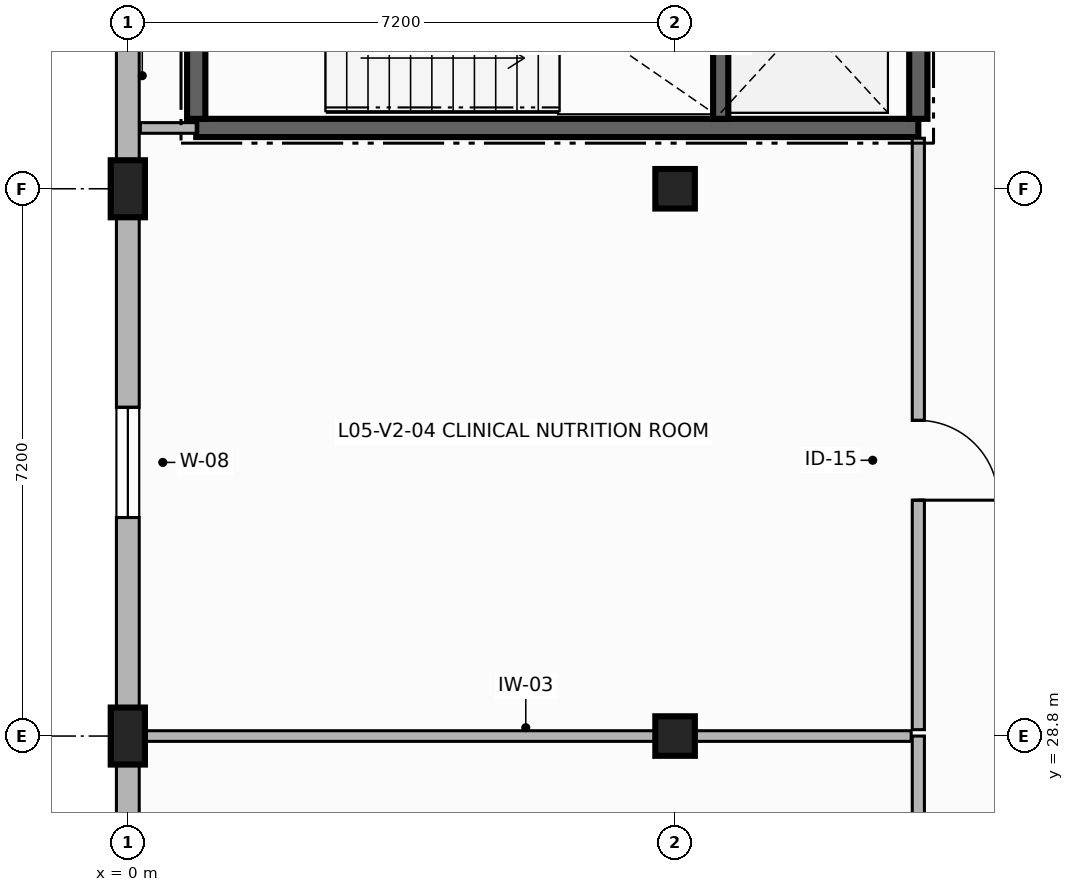
"""IFC4 building model, lengths in metres.
Left out: names, types, materials, properties, quantities, classifications, styles, units other than length and angle.
Written with IfcOpenShell. Run it as: python <this file> out.ifc"""

import sys

from ifc_helpers import new_model, si_unit, direction, frame, frame_2d, origin, origin_2d, place, context, subcontext, project, spatial, rectangle, extrude, element, fill, save


model = new_model("IFC4")
c1 = context("Model", 3, precision=1e-05, world=origin(), true_north=direction((0.0, 1.0)))
c2 = subcontext(c1, "Body", "Model", "MODEL_VIEW")
j1 = project(units=[si_unit("LENGTHUNIT", "METRE"), si_unit("PLANEANGLEUNIT", "RADIAN")], contexts=[c1])
p1 = place(None, origin())
s1 = spatial("IfcSite", under=j1, at=p1, CompositionType="ELEMENT")
p2 = place(p1, origin())
s2 = spatial("IfcBuilding", under=s1, at=p2, CompositionType="ELEMENT")
p3 = place(p2, frame((0.0, 0.0, 19.7)))
s3 = spatial("IfcBuildingStorey", under=s2, at=p3, CompositionType="ELEMENT", Elevation=19.7)
for number, where, z_axis, x_axis in (
    (1, (0.0, 28.8, 0.0), (0.0, 0.0, 1.0), (1.0, 0.0, 0.0)),
    (2, (0.0, 36.0, 0.0), (0.0, 0.0, 1.0), (1.0, 0.0, 0.0)),
):
    element("IfcColumn", number, at=place(p3, frame(where, z_axis=z_axis, x_axis=x_axis)), inside=s3, PredefinedType="PILASTER", context=c2, shape_type="SweptSolid", body=[
        extrude(rectangle(XDim=0.45, YDim=0.75, at=origin_2d()), origin(), (0.0, 0.0, 1.0), 3.42),
    ])
for number, where, z_axis, x_axis in (
    (3, (7.2, 28.8, 0.0), (0.0, 0.0, 1.0), (1.0, 0.0, 0.0)),
    (4, (7.2, 36.0, 0.0), (0.0, 0.0, 1.0), (1.0, 0.0, 0.0)),
):
    element("IfcColumn", number, at=place(p3, frame(where, z_axis=z_axis, x_axis=x_axis)), inside=s3, PredefinedType="COLUMN", context=c2, shape_type="SweptSolid", body=[
        extrude(rectangle(XDim=0.52, YDim=0.52, at=origin_2d()), origin(), (0.0, 0.0, 1.0), 3.42),
    ])
p4 = place(p3, frame((0.0, 43.2, 0.0), z_axis=(0.0, 0.0, 1.0), x_axis=(0.0, -1.0, 0.0)))
e5 = element("IfcWall", 5, at=p4, inside=s3, PredefinedType="SOLIDWALL", context=c2, shape_type="SweptSolid", body=[
    extrude(rectangle(XDim=7.2, YDim=0.3, at=frame_2d((3.6, 0.0))), origin(), (0.0, 0.0, 1.0), 2.8),
])
p5 = place(p4, frame((2.775, 0.0, 0.85)))
e6 = element("IfcOpeningElement", 6, at=p5, cuts=e5, PredefinedType="OPENING", context=c2, shape_type="SweptSolid", body=[
    extrude(rectangle(XDim=1.45, YDim=1.75, at=frame_2d((0.725, 0.875))), frame((0.0, 0.16, 0.0), z_axis=(0.0, -1.0, 0.0), x_axis=(1.0, 0.0, 0.0)), (0.0, 0.0, 1.0), 0.32),
])
p6 = place(p3, frame((0.0, 36.0, 0.0), z_axis=(0.0, 0.0, 1.0), x_axis=(0.0, -1.0, 0.0)))
e7 = element("IfcWall", 7, at=p6, inside=s3, PredefinedType="SOLIDWALL", context=c2, shape_type="SweptSolid", body=[
    extrude(rectangle(XDim=7.2, YDim=0.3, at=frame_2d((3.6, 0.0))), origin(), (0.0, 0.0, 1.0), 2.8),
])
p7 = place(p6, frame((2.875, 0.0, 0.85)))
e8 = element("IfcOpeningElement", 8, at=p7, cuts=e7, PredefinedType="OPENING", context=c2, shape_type="SweptSolid", body=[
    extrude(rectangle(XDim=1.45, YDim=1.75, at=frame_2d((0.725, 0.875))), frame((0.0, 0.16, 0.0), z_axis=(0.0, -1.0, 0.0), x_axis=(1.0, 0.0, 0.0)), (0.0, 0.0, 1.0), 0.32),
])
p8 = place(p3, frame((0.0, 28.8, 0.0), z_axis=(0.0, 0.0, 1.0), x_axis=(0.0, -1.0, 0.0)))
e9 = element("IfcWall", 9, at=p8, inside=s3, PredefinedType="SOLIDWALL", context=c2, shape_type="SweptSolid", body=[
    extrude(rectangle(XDim=7.2, YDim=0.3, at=frame_2d((3.6, 0.0))), origin(), (0.0, 0.0, 1.0), 2.8),
])
p9 = place(p8, frame((2.875, 0.0, 0.85)))
e10 = element("IfcOpeningElement", 10, at=p9, cuts=e9, PredefinedType="OPENING", context=c2, shape_type="SweptSolid", body=[
    extrude(rectangle(XDim=1.45, YDim=1.75, at=frame_2d((0.725, 0.875))), frame((0.0, 0.16, 0.0), z_axis=(0.0, -1.0, 0.0), x_axis=(1.0, 0.0, 0.0)), (0.0, 0.0, 1.0), 0.32),
])
p10 = place(p3, frame((0.9, 36.8, 0.0), z_axis=(0.0, 0.0, 1.0), x_axis=(1.0, 0.0, 0.0)))
e11 = element("IfcWall", 11, at=p10, inside=s3, PredefinedType="SHEAR", context=c2, shape_type="SweptSolid", body=[
    extrude(rectangle(XDim=9.5, YDim=0.24, at=frame_2d((4.75, 0.0))), origin(), (0.0, 0.0, 1.0), 3.42),
])
p11 = place(p3, frame((10.4, 36.92, 0.0), z_axis=(0.0, 0.0, 1.0), x_axis=(0.0, 1.0, 0.0)))
e12 = element("IfcWall", 12, at=p11, inside=s3, PredefinedType="SHEAR", context=c2, shape_type="SweptSolid", body=[
    extrude(rectangle(XDim=5.56, YDim=0.24, at=frame_2d((2.78, 0.0))), origin(), (0.0, 0.0, 1.0), 3.42),
])
p12 = place(p11, frame((4.09, 0.0, 0.0)))
e13 = element("IfcOpeningElement", 13, at=p12, cuts=e12, PredefinedType="OPENING", context=c2, shape_type="SweptSolid", body=[
    extrude(rectangle(XDim=1.15, YDim=2.2, at=frame_2d((0.575, 1.1))), frame((0.0, 0.13, 0.0), z_axis=(0.0, -1.0, 0.0), x_axis=(1.0, 0.0, 0.0)), (0.0, 0.0, 1.0), 0.26),
])
p13 = place(p3, frame((0.9, 42.48, 0.0), z_axis=(0.0, 0.0, 1.0), x_axis=(0.0, -1.0, 0.0)))
e14 = element("IfcWall", 14, at=p13, inside=s3, PredefinedType="SHEAR", context=c2, shape_type="SweptSolid", body=[
    extrude(rectangle(XDim=5.56, YDim=0.24, at=frame_2d((2.78, 0.0))), origin(), (0.0, 0.0, 1.0), 3.42),
])
p14 = place(p3, frame((7.8, 36.92, 0.0), z_axis=(0.0, 0.0, 1.0), x_axis=(0.0, 1.0, 0.0)))
e15 = element("IfcWall", 15, at=p14, inside=s3, PredefinedType="SHEAR", context=c2, shape_type="SweptSolid", body=[
    extrude(rectangle(XDim=3.68, YDim=0.2, at=frame_2d((1.84, 0.0))), origin(), (0.0, 0.0, 1.0), 3.42),
])
p15 = place(p3, frame((10.4, 28.8, 0.0), z_axis=(0.0, 0.0, 1.0), x_axis=(0.0, -1.0, 0.0)))
e16 = element("IfcWall", 16, at=p15, inside=s3, PredefinedType="PARTITIONING", context=c2, shape_type="SweptSolid", body=[
    extrude(rectangle(XDim=7.126, YDim=0.16, at=frame_2d((3.563, 0.0))), origin(), (0.0, 0.0, 1.0), 2.78),
])
p16 = place(p15, frame((3.003, 0.0, 0.0)))
e17 = element("IfcOpeningElement", 17, at=p16, cuts=e16, PredefinedType="OPENING", context=c2, shape_type="SweptSolid", body=[
    extrude(rectangle(XDim=1.35, YDim=2.25, at=frame_2d((0.675, 1.125))), frame((0.0, 0.09, 0.0), z_axis=(0.0, -1.0, 0.0), x_axis=(1.0, 0.0, 0.0)), (0.0, 0.0, 1.0), 0.18),
])
p17 = place(p3, frame((0.165, 28.8, 0.0), z_axis=(0.0, 0.0, 1.0), x_axis=(1.0, 0.0, 0.0)))
e18 = element("IfcWall", 18, at=p17, inside=s3, PredefinedType="PARTITIONING", context=c2, shape_type="SweptSolid", body=[
    extrude(rectangle(XDim=10.141, YDim=0.14, at=frame_2d((5.07, 0.0))), origin(), (0.0, 0.0, 1.0), 2.78),
])
p18 = place(p3, frame((10.4, 36.665, 0.0), z_axis=(0.0, 0.0, 1.0), x_axis=(0.0, -1.0, 0.0)))
e19 = element("IfcWall", 19, at=p18, inside=s3, PredefinedType="PARTITIONING", context=c2, shape_type="SweptSolid", body=[
    extrude(rectangle(XDim=7.781, YDim=0.16, at=frame_2d((3.891, 0.0))), origin(), (0.0, 0.0, 1.0), 2.78),
])
p19 = place(p18, frame((3.712, 0.0, 0.0)))
e20 = element("IfcOpeningElement", 20, at=p19, cuts=e19, PredefinedType="OPENING", context=c2, shape_type="SweptSolid", body=[
    extrude(rectangle(XDim=1.05, YDim=2.2, at=frame_2d((0.525, 1.1))), frame((0.0, 0.09, 0.0), z_axis=(0.0, -1.0, 0.0), x_axis=(1.0, 0.0, 0.0)), (0.0, 0.0, 1.0), 0.18),
])
p20 = place(p3, frame((0.165, 36.8, 0.0), z_axis=(0.0, 0.0, 1.0), x_axis=(1.0, 0.0, 0.0)))
e21 = element("IfcWall", 21, at=p20, inside=s3, PredefinedType="PARTITIONING", context=c2, shape_type="SweptSolid", body=[
    extrude(rectangle(XDim=0.735, YDim=0.14, at=frame_2d((0.367, 0.0))), origin(), (0.0, 0.0, 1.0), 2.78),
])
p21 = place(p7, origin())
e22 = element("IfcWindow", 22, at=p21, inside=s3, PartitioningType="SINGLE_PANEL", PredefinedType="WINDOW", context=c2, shape_type="SweptSolid", body=[
    extrude(rectangle(XDim=1.45, YDim=1.75, at=frame_2d((0.725, 0.875))), frame((0.0, 0.03, 0.0), z_axis=(0.0, -1.0, 0.0), x_axis=(1.0, 0.0, 0.0)), (0.0, 0.0, 1.0), 0.06),
])
fill(e8, e22)
p22 = place(p19, origin())
e23 = element("IfcDoor", 23, at=p22, inside=s3, OperationType="SINGLE_SWING_RIGHT", PredefinedType="DOOR", context=c2, shape_type="SweptSolid", body=[
    extrude(rectangle(XDim=1.05, YDim=2.2, at=frame_2d((0.525, 1.1))), frame((0.0, 0.025, 0.0), z_axis=(0.0, -1.0, 0.0), x_axis=(1.0, 0.0, 0.0)), (0.0, 0.0, 1.0), 0.05),
])
fill(e20, e23)
save(model, sys.argv[1])
